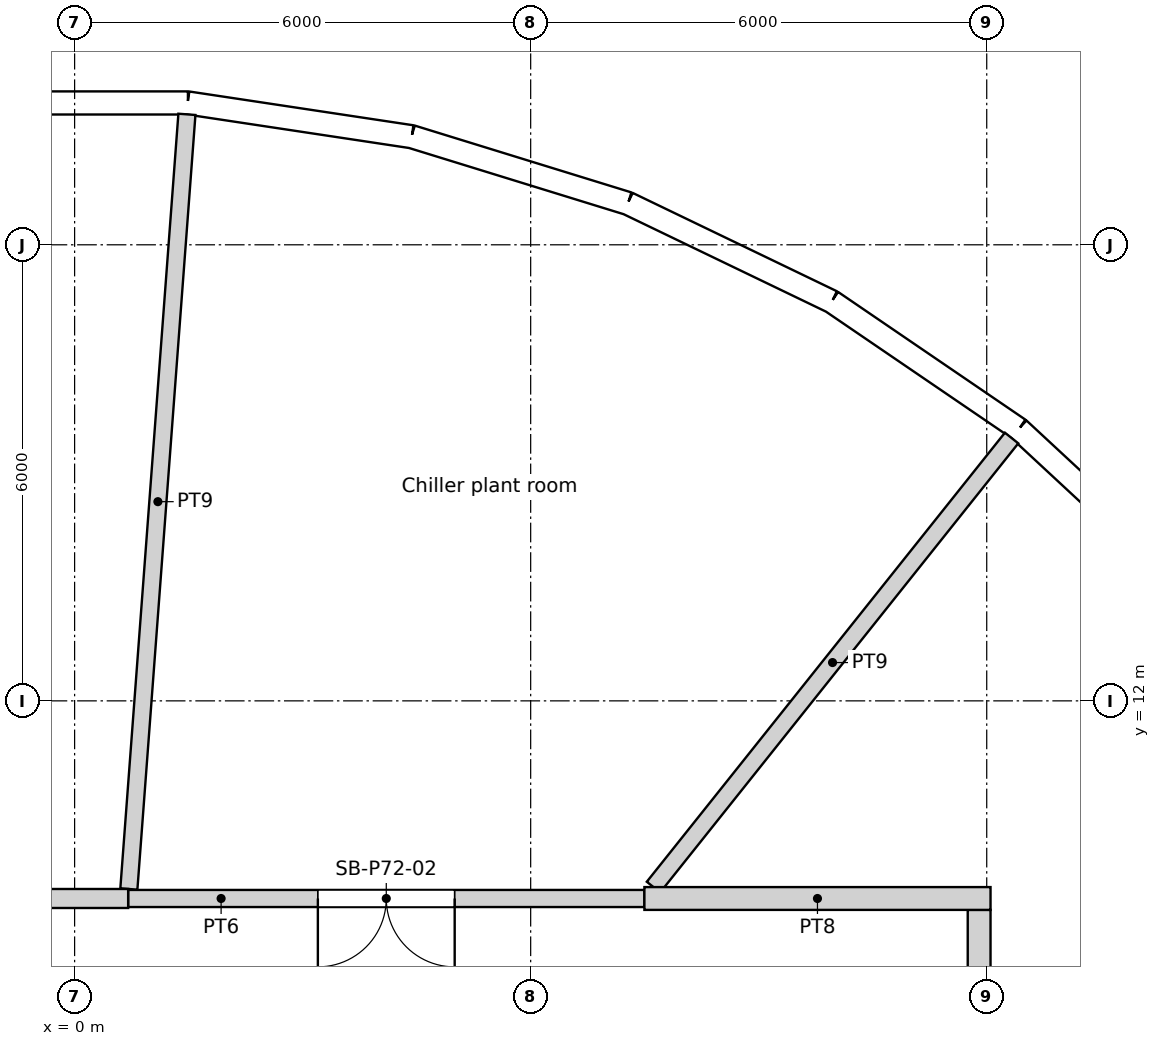
"""IFC4 building model, lengths in metres.
Left out: names, types, materials, properties, quantities, classifications, styles, units other than length and angle.
Written with IfcOpenShell. Run it as: python <this file> out.ifc"""

import sys

from ifc_helpers import new_model, si_unit, direction, frame, frame_2d, origin, origin_2d, place, context, subcontext, project, spatial, rectangle, circle, extrude, element, fill, save


model = new_model("IFC4")
c1 = context("Model", 3, precision=1e-05, world=origin(), true_north=direction((0.0, 1.0)))
c2 = subcontext(c1, "Body", "Model", "MODEL_VIEW")
j1 = project(units=[si_unit("LENGTHUNIT", "METRE"), si_unit("PLANEANGLEUNIT", "RADIAN")], contexts=[c1])
p1 = place(None, origin())
s1 = spatial("IfcSite", under=j1, at=p1, CompositionType="ELEMENT")
p2 = place(p1, origin())
s2 = spatial("IfcBuilding", under=s1, at=p2, CompositionType="ELEMENT")
p3 = place(p2, frame((0.0, 0.0, 277.8)))
s3 = spatial("IfcBuildingStorey", under=s2, at=p3, CompositionType="ELEMENT", Elevation=277.8)
for number, where, z_axis, x_axis in (
    (1, (11.735, 14.716, 0.0), (0.0, 0.0, 1.0), (1.0, 0.0, 0.0)),
    (2, (6.876, 17.521, 0.0), (0.0, 0.0, 1.0), (1.0, 0.0, 0.0)),
    (3, (1.406, 18.77, 0.0), (0.0, 0.0, 1.0), (1.0, 0.0, 0.0)),
):
    element("IfcColumn", number, at=place(p3, frame(where, z_axis=z_axis, x_axis=x_axis)), inside=s3, PredefinedType="COLUMN", context=c2, shape_type="SweptSolid", body=[
        extrude(circle(Radius=0.55, at=origin_2d()), origin(), (0.0, 0.0, 1.0), 6.0),
    ])
p4 = place(p3, frame((14.604, 13.55, 0.0), z_axis=(0.0, 0.0, 1.0), x_axis=(-0.733056277766, 0.68016798927, 0.0)))
e4 = element("IfcWall", 4, at=p4, inside=s3, PredefinedType="SOLIDWALL", context=c2, shape_type="SweptSolid", body=[
    extrude(rectangle(XDim=2.978, YDim=0.3, at=frame_2d((1.489, 0.0))), origin(), (0.0, 0.0, 1.0), 5.65),
])
p5 = place(p4, frame((1.489, 0.0, 1.825)))
e5 = element("IfcOpeningElement", 5, at=p5, cuts=e4, PredefinedType="OPENING", context=c2, shape_type="SweptSolid", body=[
    extrude(circle(Radius=1.2, at=origin_2d()), frame((0.0, 0.16, 0.0), z_axis=(0.0, -1.0, 0.0), x_axis=(1.0, 0.0, 0.0)), (0.0, 0.0, 1.0), 0.32),
])
p6 = place(p3, frame((12.421, 15.575, 0.0), z_axis=(0.0, 0.0, 1.0), x_axis=(-0.826253362584, 0.56329866041, 0.0)))
e6 = element("IfcWall", 6, at=p6, inside=s3, PredefinedType="SOLIDWALL", context=c2, shape_type="SweptSolid", body=[
    extrude(rectangle(XDim=2.978, YDim=0.3, at=frame_2d((1.489, 0.0))), origin(), (0.0, 0.0, 1.0), 5.65),
])
p7 = place(p6, frame((1.489, 0.0, 1.825)))
e7 = element("IfcOpeningElement", 7, at=p7, cuts=e6, PredefinedType="OPENING", context=c2, shape_type="SweptSolid", body=[
    extrude(circle(Radius=1.2, at=origin_2d()), frame((0.0, 0.16, 0.0), z_axis=(0.0, -1.0, 0.0), x_axis=(1.0, 0.0, 0.0)), (0.0, 0.0, 1.0), 0.32),
])
p8 = place(p3, frame((9.961, 17.253, 0.0), z_axis=(0.0, 0.0, 1.0), x_axis=(-0.900954184324, 0.433914228562, 0.0)))
e8 = element("IfcWall", 8, at=p8, inside=s3, PredefinedType="SOLIDWALL", context=c2, shape_type="SweptSolid", body=[
    extrude(rectangle(XDim=2.978, YDim=0.3, at=frame_2d((1.489, 0.0))), origin(), (0.0, 0.0, 1.0), 5.2),
])
p9 = place(p8, frame((1.489, 0.0, 1.825)))
e9 = element("IfcOpeningElement", 9, at=p9, cuts=e8, PredefinedType="OPENING", context=c2, shape_type="SweptSolid", body=[
    extrude(circle(Radius=1.2, at=origin_2d()), frame((0.0, 0.16, 0.0), z_axis=(0.0, -1.0, 0.0), x_axis=(1.0, 0.0, 0.0)), (0.0, 0.0, 1.0), 0.32),
])
p10 = place(p3, frame((7.278, 18.545, 0.0), z_axis=(0.0, 0.0, 1.0), x_axis=(-0.955567792294, 0.294771427261, 0.0)))
e10 = element("IfcWall", 10, at=p10, inside=s3, PredefinedType="SOLIDWALL", context=c2, shape_type="SweptSolid", body=[
    extrude(rectangle(XDim=2.978, YDim=0.3, at=frame_2d((1.489, 0.0))), origin(), (0.0, 0.0, 1.0), 5.65),
])
p11 = place(p10, frame((1.489, 0.0, 1.825)))
e11 = element("IfcOpeningElement", 11, at=p11, cuts=e10, PredefinedType="OPENING", context=c2, shape_type="SweptSolid", body=[
    extrude(circle(Radius=1.2, at=origin_2d()), frame((0.0, 0.16, 0.0), z_axis=(0.0, -1.0, 0.0), x_axis=(1.0, 0.0, 0.0)), (0.0, 0.0, 1.0), 0.32),
])
p12 = place(p3, frame((4.433, 19.422, 0.0), z_axis=(0.0, 0.0, 1.0), x_axis=(-0.988839917871, 0.148981934558, 0.0)))
e12 = element("IfcWall", 12, at=p12, inside=s3, PredefinedType="SOLIDWALL", context=c2, shape_type="SweptSolid", body=[
    extrude(rectangle(XDim=2.978, YDim=0.3, at=frame_2d((1.489, 0.0))), origin(), (0.0, 0.0, 1.0), 5.65),
])
p13 = place(p12, frame((1.489, 0.0, 1.825)))
e13 = element("IfcOpeningElement", 13, at=p13, cuts=e12, PredefinedType="OPENING", context=c2, shape_type="SweptSolid", body=[
    extrude(circle(Radius=1.2, at=origin_2d()), frame((0.0, 0.16, 0.0), z_axis=(0.0, -1.0, 0.0), x_axis=(1.0, 0.0, 0.0)), (0.0, 0.0, 1.0), 0.32),
])
p14 = place(p3, frame((1.489, 19.866, 0.0), z_axis=(0.0, 0.0, 1.0), x_axis=(-1.0, 0.0, 0.0)))
e14 = element("IfcWall", 14, at=p14, inside=s3, PredefinedType="SOLIDWALL", context=c2, shape_type="SweptSolid", body=[
    extrude(rectangle(XDim=2.978, YDim=0.3, at=frame_2d((1.489, 0.0))), origin(), (0.0, 0.0, 1.0), 5.2),
])
p15 = place(p14, frame((1.489, 0.0, 1.825)))
e15 = element("IfcOpeningElement", 15, at=p15, cuts=e14, PredefinedType="OPENING", context=c2, shape_type="SweptSolid", body=[
    extrude(circle(Radius=1.2, at=origin_2d()), frame((0.0, 0.16, 0.0), z_axis=(0.0, -1.0, 0.0), x_axis=(1.0, 0.0, 0.0)), (0.0, 0.0, 1.0), 0.32),
])
p16 = place(p3, frame((0.704, 9.4, 0.0), z_axis=(0.0, 0.0, 1.0), x_axis=(-1.0, 0.0, 0.0)))
e16 = element("IfcWall", 16, at=p16, inside=s3, PredefinedType="PARTITIONING", context=c2, shape_type="SweptSolid", body=[
    extrude(rectangle(XDim=2.85, YDim=0.25, at=frame_2d((1.425, 0.0))), origin(), (0.0, 0.0, 1.0), 5.65),
])
p17 = place(p3, frame((1.478, 19.716, 0.0), z_axis=(0.0, 0.0, 1.0), x_axis=(-0.074725214319, -0.99720416282, 0.0)))
e17 = element("IfcWall", 17, at=p17, inside=s3, PredefinedType="PARTITIONING", context=c2, shape_type="SweptSolid", body=[
    extrude(rectangle(XDim=10.22, YDim=0.225, at=frame_2d((5.11, 0.0))), origin(), (0.0, 0.0, 1.0), 2.7),
])
p18 = place(p3, frame((7.496, 9.4, 0.0), z_axis=(0.0, 0.0, 1.0), x_axis=(-1.0, 0.0, 0.0)))
e18 = element("IfcWall", 18, at=p18, inside=s3, PredefinedType="PARTITIONING", context=c2, shape_type="SweptSolid", body=[
    extrude(rectangle(XDim=6.792, YDim=0.225, at=frame_2d((3.396, 0.0))), origin(), (0.0, 0.0, 1.0), 5.65),
])
p19 = place(p18, frame((2.496, 0.0, 0.0)))
e19 = element("IfcOpeningElement", 19, at=p19, cuts=e18, PredefinedType="OPENING", context=c2, shape_type="SweptSolid", body=[
    extrude(rectangle(XDim=1.8, YDim=2.4, at=frame_2d((0.9, 1.2))), frame((0.0, 0.113, 0.0), z_axis=(0.0, -1.0, 0.0), x_axis=(1.0, 0.0, 0.0)), (0.0, 0.0, 1.0), 0.225),
])
p20 = place(p3, frame((11.9, 0.0, 0.0), z_axis=(0.0, 0.0, 1.0), x_axis=(0.0, 1.0, 0.0)))
e20 = element("IfcWall", 20, at=p20, inside=s3, PredefinedType="PARTITIONING", context=c2, shape_type="SweptSolid", body=[
    extrude(rectangle(XDim=9.25, YDim=0.3, at=frame_2d((4.625, 0.0))), origin(), (0.0, 0.0, 1.0), 5.65),
])
p21 = place(p20, frame((3.8, 0.0, 0.0)))
e21 = element("IfcOpeningElement", 21, at=p21, cuts=e20, PredefinedType="OPENING", context=c2, shape_type="SweptSolid", body=[
    extrude(rectangle(XDim=1.8, YDim=2.4, at=frame_2d((0.9, 1.2))), frame((0.0, 0.15, 0.0), z_axis=(0.0, -1.0, 0.0), x_axis=(1.0, 0.0, 0.0)), (0.0, 0.0, 1.0), 0.3),
])
p22 = place(p3, frame((12.05, 9.4, 0.0), z_axis=(0.0, 0.0, 1.0), x_axis=(-1.0, 0.0, 0.0)))
e22 = element("IfcWall", 22, at=p22, inside=s3, PredefinedType="PARTITIONING", context=c2, shape_type="SweptSolid", body=[
    extrude(rectangle(XDim=4.554, YDim=0.3, at=frame_2d((2.277, 0.0))), origin(), (0.0, 0.0, 1.0), 5.65),
])
p23 = place(p3, frame((12.327, 15.458, 0.0), z_axis=(0.0, 0.0, 1.0), x_axis=(-0.623488645806, -0.781832404388, 0.0)))
e23 = element("IfcWall", 23, at=p23, inside=s3, PredefinedType="PARTITIONING", context=c2, shape_type="SweptSolid", body=[
    extrude(rectangle(XDim=7.557, YDim=0.225, at=frame_2d((3.778, 0.0))), origin(), (0.0, 0.0, 1.0), 2.7),
])
p24 = place(p5, origin())
e24 = element("IfcWindow", 24, at=p24, inside=s3, PartitioningType="SINGLE_PANEL", PredefinedType="WINDOW", context=c2, shape_type="SweptSolid", body=[
    extrude(circle(Radius=1.2, at=origin_2d()), frame((0.0, 0.12, 0.0), z_axis=(0.0, -1.0, 0.0), x_axis=(1.0, 0.0, 0.0)), (0.0, 0.0, 1.0), 0.1),
])
fill(e5, e24)
p25 = place(p7, origin())
e25 = element("IfcWindow", 25, at=p25, inside=s3, PartitioningType="SINGLE_PANEL", PredefinedType="WINDOW", context=c2, shape_type="SweptSolid", body=[
    extrude(circle(Radius=1.2, at=origin_2d()), frame((0.0, 0.12, 0.0), z_axis=(0.0, -1.0, 0.0), x_axis=(1.0, 0.0, 0.0)), (0.0, 0.0, 1.0), 0.1),
])
fill(e7, e25)
p26 = place(p9, origin())
e26 = element("IfcWindow", 26, at=p26, inside=s3, PartitioningType="SINGLE_PANEL", PredefinedType="WINDOW", context=c2, shape_type="SweptSolid", body=[
    extrude(circle(Radius=1.2, at=origin_2d()), frame((0.0, 0.12, 0.0), z_axis=(0.0, -1.0, 0.0), x_axis=(1.0, 0.0, 0.0)), (0.0, 0.0, 1.0), 0.1),
])
fill(e9, e26)
p27 = place(p11, origin())
e27 = element("IfcWindow", 27, at=p27, inside=s3, PartitioningType="SINGLE_PANEL", PredefinedType="WINDOW", context=c2, shape_type="SweptSolid", body=[
    extrude(circle(Radius=1.2, at=origin_2d()), frame((0.0, 0.12, 0.0), z_axis=(0.0, -1.0, 0.0), x_axis=(1.0, 0.0, 0.0)), (0.0, 0.0, 1.0), 0.1),
])
fill(e11, e27)
p28 = place(p13, origin())
e28 = element("IfcWindow", 28, at=p28, inside=s3, PartitioningType="SINGLE_PANEL", PredefinedType="WINDOW", context=c2, shape_type="SweptSolid", body=[
    extrude(circle(Radius=1.2, at=origin_2d()), frame((0.0, 0.12, 0.0), z_axis=(0.0, -1.0, 0.0), x_axis=(1.0, 0.0, 0.0)), (0.0, 0.0, 1.0), 0.1),
])
fill(e13, e28)
p29 = place(p15, origin())
e29 = element("IfcWindow", 29, at=p29, inside=s3, PartitioningType="SINGLE_PANEL", PredefinedType="WINDOW", context=c2, shape_type="SweptSolid", body=[
    extrude(circle(Radius=1.2, at=origin_2d()), frame((0.0, 0.12, 0.0), z_axis=(0.0, -1.0, 0.0), x_axis=(1.0, 0.0, 0.0)), (0.0, 0.0, 1.0), 0.1),
])
fill(e15, e29)
p30 = place(p19, origin())
e30 = element("IfcDoor", 30, at=p30, inside=s3, OperationType="DOUBLE_DOOR_SINGLE_SWING", PredefinedType="DOOR", context=c2, shape_type="SweptSolid", body=[
    extrude(rectangle(XDim=1.8, YDim=2.4, at=frame_2d((0.9, 1.2))), frame((0.0, 0.025, 0.0), z_axis=(0.0, -1.0, 0.0), x_axis=(1.0, 0.0, 0.0)), (0.0, 0.0, 1.0), 0.05),
])
fill(e19, e30)
save(model, sys.argv[1])
